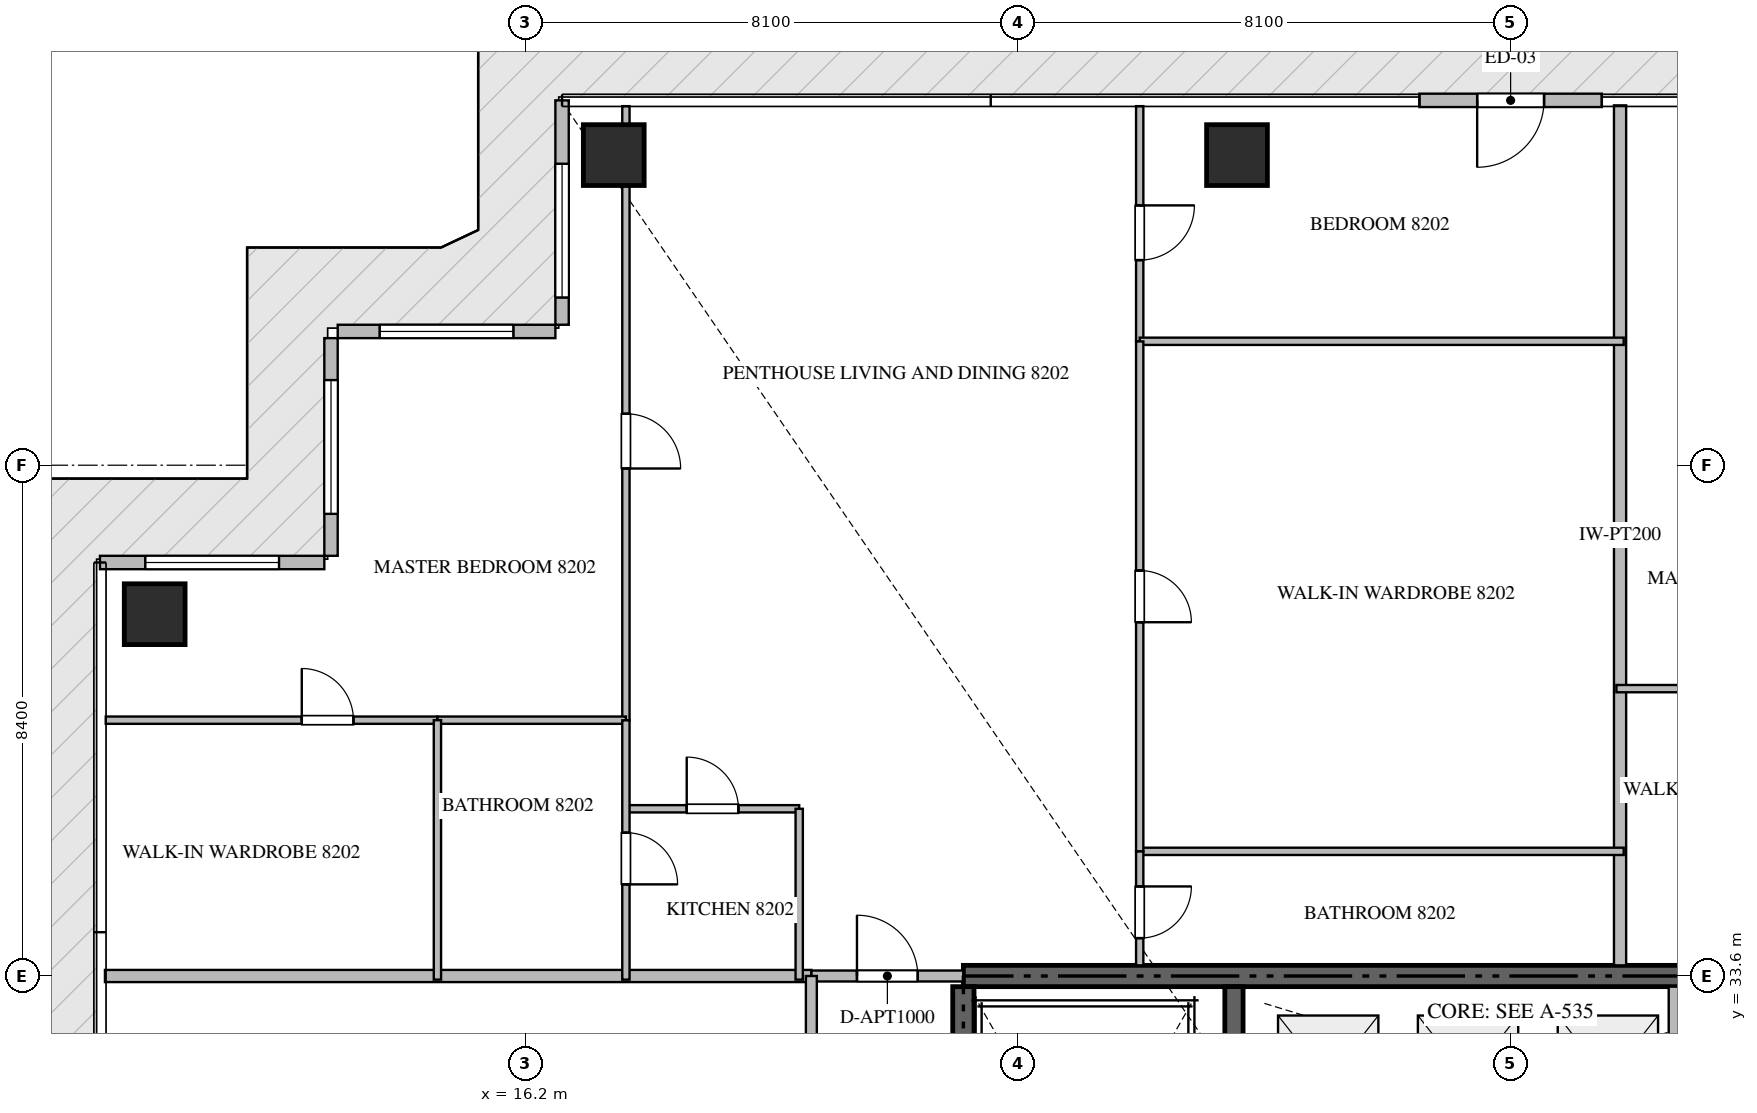
"""IFC4 building model, lengths in metres.
Left out: names, types, materials, properties, quantities, classifications, styles, units other than length and angle.
Written with IfcOpenShell. Run it as: python <this file> out.ifc"""

import sys

from ifc_helpers import new_model, si_unit, direction, frame, frame_2d, origin, origin_2d, place, context, subcontext, project, spatial, rectangle, extrude, source, transform, mapped, element, fill, save


model = new_model("IFC4")
c1 = context("Model", 3, precision=1e-05, world=origin(), true_north=direction((0.0, 1.0)))
c2 = subcontext(c1, "Body", "Model", "MODEL_VIEW")
j1 = project(units=[si_unit("LENGTHUNIT", "METRE"), si_unit("PLANEANGLEUNIT", "RADIAN")], contexts=[c1])
p1 = place(None, origin())
s1 = spatial("IfcSite", under=j1, at=p1, CompositionType="ELEMENT")
p2 = place(p1, origin())
s2 = spatial("IfcBuilding", under=s1, at=p2, CompositionType="ELEMENT")
p3 = place(p2, frame((0.0, 0.0, 329.9)))
s3 = spatial("IfcBuildingStorey", under=s2, at=p3, CompositionType="ELEMENT", Elevation=329.9)
p4 = place(p3, frame((41.4, 33.6, -0.26), z_axis=(0.0, 0.0, 1.0), x_axis=(-1.0, 0.0, 0.0)))
e1 = element("IfcWall", 1, at=p4, inside=s3, PredefinedType="SHEAR", context=c2, shape_type="SweptSolid", body=[
    extrude(rectangle(XDim=18.0, YDim=0.35, at=frame_2d((9.0, 0.0))), origin(), (0.0, 0.0, 1.0), 4.048),
])
p5 = place(p3, frame((23.4, 24.25, -0.26), z_axis=(0.0, 0.0, 1.0), x_axis=(0.0, 1.0, 0.0)))
e2 = element("IfcWall", 2, at=p5, inside=s3, PredefinedType="SHEAR", context=c2, shape_type="SweptSolid", body=[
    extrude(rectangle(XDim=9.175, YDim=0.35, at=frame_2d((4.587, 0.0))), origin(), (0.0, 0.0, 1.0), 4.048),
])
p6 = place(p3, frame((27.85, 23.55, -0.26), z_axis=(0.0, 0.0, 1.0), x_axis=(0.0, 1.0, 0.0)))
e3 = element("IfcWall", 3, at=p6, inside=s3, PredefinedType="SHEAR", context=c2, shape_type="SweptSolid", body=[
    extrude(rectangle(XDim=9.875, YDim=0.3, at=frame_2d((4.938, 0.0))), origin(), (0.0, 0.0, 1.0), 4.048),
])
m1 = source(origin(), c2, "Body", "SweptSolid", [
    extrude(rectangle(XDim=1.0, YDim=1.0, at=origin_2d()), origin(), (0.0, 0.0, 1.0), 4.05),
])
for number, where, z_axis, x_axis in (
    (4, (17.65, 47.1, -0.26), (0.0, 0.0, 1.0), (1.0, 0.0, 0.0)),
    (5, (27.9, 47.1, -0.26), (0.0, 0.0, 1.0), (1.0, 0.0, 0.0)),
    (6, (10.1, 39.55, -0.26), (0.0, 0.0, 1.0), (1.0, 0.0, 0.0)),
):
    element("IfcColumn", number, at=place(p3, frame(where, z_axis=z_axis, x_axis=x_axis)), inside=s3, PredefinedType="COLUMN", context=c2, shape_type="MappedRepresentation", body=[
        mapped(m1, transform((0.0, 0.0, 0.0), scale=1.0)),
    ])
p7 = place(p3, frame((33.9, 48.0, 0.0), z_axis=(0.0, 0.0, 1.0), x_axis=(-1.0, 0.0, 0.0)))
e7 = element("IfcWall", 7, at=p7, inside=s3, PredefinedType="ELEMENTEDWALL", context=c2, shape_type="SweptSolid", body=[
    extrude(rectangle(XDim=3.0, YDim=0.22, at=frame_2d((1.5, 0.0))), origin(), (0.0, 0.0, 1.0), 3.775),
])
p8 = place(p7, frame((0.95, 0.0, 0.0)))
e8 = element("IfcOpeningElement", 8, at=p8, cuts=e7, PredefinedType="OPENING", context=c2, shape_type="SweptSolid", body=[
    extrude(rectangle(XDim=1.1, YDim=2.2, at=frame_2d((0.55, 1.1))), frame((0.0, 0.12, 0.0), z_axis=(0.0, -1.0, 0.0), x_axis=(1.0, 0.0, 0.0)), (0.0, 0.0, 1.0), 0.24),
])
p9 = place(p3, frame((16.8, 48.0, 0.0), z_axis=(0.0, 0.0, 1.0), x_axis=(0.0, -1.0, 0.0)))
e9 = element("IfcWall", 9, at=p9, inside=s3, PredefinedType="ELEMENTEDWALL", context=c2, shape_type="SweptSolid", body=[
    extrude(rectangle(XDim=3.69, YDim=0.22, at=frame_2d((1.845, 0.0))), origin(), (0.0, 0.0, 1.0), 3.775),
])
p10 = place(p9, frame((1.043, 0.0, 0.65)))
e10 = element("IfcOpeningElement", 10, at=p10, cuts=e9, PredefinedType="OPENING", context=c2, shape_type="SweptSolid", body=[
    extrude(rectangle(XDim=2.2, YDim=2.4, at=frame_2d((1.1, 1.2))), frame((0.0, 0.12, 0.0), z_axis=(0.0, -1.0, 0.0), x_axis=(1.0, 0.0, 0.0)), (0.0, 0.0, 1.0), 0.24),
])
p11 = place(p3, frame((16.69, 44.2, 0.0), z_axis=(0.0, 0.0, 1.0), x_axis=(-1.0, 0.0, 0.0)))
e11 = element("IfcWall", 11, at=p11, inside=s3, PredefinedType="ELEMENTEDWALL", context=c2, shape_type="SweptSolid", body=[
    extrude(rectangle(XDim=3.58, YDim=0.22, at=frame_2d((1.79, 0.0))), origin(), (0.0, 0.0, 1.0), 3.775),
])
p12 = place(p11, frame((0.69, 0.0, 0.65)))
e12 = element("IfcOpeningElement", 12, at=p12, cuts=e11, PredefinedType="OPENING", context=c2, shape_type="SweptSolid", body=[
    extrude(rectangle(XDim=2.2, YDim=2.4, at=frame_2d((1.1, 1.2))), frame((0.0, 0.12, 0.0), z_axis=(0.0, -1.0, 0.0), x_axis=(1.0, 0.0, 0.0)), (0.0, 0.0, 1.0), 0.24),
])
p13 = place(p3, frame((13.0, 44.09, 0.0), z_axis=(0.0, 0.0, 1.0), x_axis=(0.0, -1.0, 0.0)))
e13 = element("IfcWall", 13, at=p13, inside=s3, PredefinedType="ELEMENTEDWALL", context=c2, shape_type="SweptSolid", body=[
    extrude(rectangle(XDim=3.58, YDim=0.22, at=frame_2d((1.79, 0.0))), origin(), (0.0, 0.0, 1.0), 3.775),
])
p14 = place(p13, frame((0.69, 0.0, 0.65)))
e14 = element("IfcOpeningElement", 14, at=p14, cuts=e13, PredefinedType="OPENING", context=c2, shape_type="SweptSolid", body=[
    extrude(rectangle(XDim=2.2, YDim=2.4, at=frame_2d((1.1, 1.2))), frame((0.0, 0.12, 0.0), z_axis=(0.0, -1.0, 0.0), x_axis=(1.0, 0.0, 0.0)), (0.0, 0.0, 1.0), 0.24),
])
p15 = place(p3, frame((12.89, 40.4, 0.0), z_axis=(0.0, 0.0, 1.0), x_axis=(-1.0, 0.0, 0.0)))
e15 = element("IfcWall", 15, at=p15, inside=s3, PredefinedType="ELEMENTEDWALL", context=c2, shape_type="SweptSolid", body=[
    extrude(rectangle(XDim=3.69, YDim=0.22, at=frame_2d((1.845, 0.0))), origin(), (0.0, 0.0, 1.0), 3.775),
])
p16 = place(p15, frame((0.745, 0.0, 0.65)))
e16 = element("IfcOpeningElement", 16, at=p16, cuts=e15, PredefinedType="OPENING", context=c2, shape_type="SweptSolid", body=[
    extrude(rectangle(XDim=2.2, YDim=2.4, at=frame_2d((1.1, 1.2))), frame((0.0, 0.12, 0.0), z_axis=(0.0, -1.0, 0.0), x_axis=(1.0, 0.0, 0.0)), (0.0, 0.0, 1.0), 0.24),
])
p17 = place(p3, frame((35.1, 30.75, 0.0), z_axis=(0.0, 0.0, 1.0), x_axis=(0.0, 1.0, 0.0)))
e17 = element("IfcWall", 17, at=p17, inside=s3, PredefinedType="STANDARD", context=c2, shape_type="SweptSolid", body=[
    extrude(rectangle(XDim=2.675, YDim=0.2, at=frame_2d((1.337, 0.0))), origin(), (0.0, 0.0, 1.0), 3.79),
])
p18 = place(p3, frame((34.2, 33.775, 0.0), z_axis=(0.0, 0.0, 1.0), x_axis=(0.0, 1.0, 0.0)))
e18 = element("IfcWall", 18, at=p18, inside=s3, PredefinedType="PARTITIONING", context=c2, shape_type="SweptSolid", body=[
    extrude(rectangle(XDim=14.143, YDim=0.2, at=frame_2d((7.072, 0.0))), origin(), (0.0, 0.0, 1.0), 3.79),
])
p19 = place(p3, frame((9.282, 33.6, 0.0), z_axis=(0.0, 0.0, 1.0), x_axis=(1.0, 0.0, 0.0)))
e19 = element("IfcWall", 19, at=p19, inside=s3, PredefinedType="PARTITIONING", context=c2, shape_type="SweptSolid", body=[
    extrude(rectangle(XDim=11.618, YDim=0.2, at=frame_2d((5.809, 0.0))), origin(), (0.0, 0.0, 1.0), 3.79),
])
p20 = place(p3, frame((20.902, 33.6, 0.0), z_axis=(0.0, 0.0, 1.0), x_axis=(1.0, 0.0, 0.0)))
e20 = element("IfcWall", 20, at=p20, inside=s3, PredefinedType="PARTITIONING", context=c2, shape_type="SweptSolid", body=[
    extrude(rectangle(XDim=2.496, YDim=0.18, at=frame_2d((1.248, 0.0))), origin(), (0.0, 0.0, 1.0), 3.79),
])
p21 = place(p20, frame((0.748, 0.0, 0.0)))
e21 = element("IfcOpeningElement", 21, at=p21, cuts=e20, PredefinedType="OPENING", context=c2, shape_type="SweptSolid", body=[
    extrude(rectangle(XDim=1.0, YDim=2.15, at=frame_2d((0.5, 1.075))), frame((0.0, 0.1, 0.0), z_axis=(0.0, -1.0, 0.0), x_axis=(1.0, 0.0, 0.0)), (0.0, 0.0, 1.0), 0.2),
])
p22 = place(p3, frame((20.9, 16.8, 0.0), z_axis=(0.0, 0.0, 1.0), x_axis=(0.0, 1.0, 0.0)))
e22 = element("IfcWall", 22, at=p22, inside=s3, PredefinedType="PARTITIONING", context=c2, shape_type="SweptSolid", body=[
    extrude(rectangle(XDim=16.8, YDim=0.18, at=frame_2d((8.4, 0.0))), origin(), (0.0, 0.0, 1.0), 3.79),
])
p23 = place(p22, frame((4.803, 0.0, 0.0)))
e23 = element("IfcOpeningElement", 23, at=p23, cuts=e22, PredefinedType="OPENING", context=c2, shape_type="SweptSolid", body=[
    extrude(rectangle(XDim=1.0, YDim=2.15, at=frame_2d((0.5, 1.075))), frame((0.0, 0.1, 0.0), z_axis=(0.0, -1.0, 0.0), x_axis=(1.0, 0.0, 0.0)), (0.0, 0.0, 1.0), 0.2),
])
p24 = place(p22, frame((13.225, 0.0, 0.0)))
e24 = element("IfcOpeningElement", 24, at=p24, cuts=e22, PredefinedType="OPENING", context=c2, shape_type="SweptSolid", body=[
    extrude(rectangle(XDim=1.0, YDim=2.15, at=frame_2d((0.5, 1.075))), frame((0.0, 0.1, 0.0), z_axis=(0.0, -1.0, 0.0), x_axis=(1.0, 0.0, 0.0)), (0.0, 0.0, 1.0), 0.2),
])
p25 = place(p3, frame((17.85, 36.35, 0.0), z_axis=(0.0, 0.0, 1.0), x_axis=(1.0, 0.0, 0.0)))
e25 = element("IfcWall", 25, at=p25, inside=s3, PredefinedType="PARTITIONING", context=c2, shape_type="SweptSolid", body=[
    extrude(rectangle(XDim=2.85, YDim=0.12, at=frame_2d((1.425, 0.0))), origin(), (0.0, 0.0, 1.0), 3.492),
])
p26 = place(p25, frame((1.0, 0.0, 0.0)))
e26 = element("IfcOpeningElement", 26, at=p26, cuts=e25, PredefinedType="OPENING", context=c2, shape_type="SweptSolid", body=[
    extrude(rectangle(XDim=0.85, YDim=2.1, at=frame_2d((0.425, 1.05))), frame((0.0, 0.07, 0.0), z_axis=(0.0, -1.0, 0.0), x_axis=(1.0, 0.0, 0.0)), (0.0, 0.0, 1.0), 0.14),
])
p27 = place(p3, frame((20.7, 36.35, 0.0), z_axis=(0.0, 0.0, 1.0), x_axis=(0.0, -1.0, 0.0)))
e27 = element("IfcWall", 27, at=p27, inside=s3, PredefinedType="PARTITIONING", context=c2, shape_type="SweptSolid", body=[
    extrude(rectangle(XDim=2.81, YDim=0.12, at=frame_2d((1.405, 0.0))), origin(), (0.0, 0.0, 1.0), 3.79),
])
p28 = place(p3, frame((17.85, 47.905, 0.0), z_axis=(0.0, 0.0, 1.0), x_axis=(0.0, -1.0, 0.0)))
e28 = element("IfcWall", 28, at=p28, inside=s3, PredefinedType="PARTITIONING", context=c2, shape_type="SweptSolid", body=[
    extrude(rectangle(XDim=10.098, YDim=0.12, at=frame_2d((5.049, 0.0))), origin(), (0.0, 0.0, 1.0), 3.292),
])
p29 = place(p28, frame((5.059, 0.0, 0.0)))
e29 = element("IfcOpeningElement", 29, at=p29, cuts=e28, PredefinedType="OPENING", context=c2, shape_type="SweptSolid", body=[
    extrude(rectangle(XDim=0.9, YDim=2.1, at=frame_2d((0.45, 1.05))), frame((0.0, 0.07, 0.0), z_axis=(0.0, -1.0, 0.0), x_axis=(1.0, 0.0, 0.0)), (0.0, 0.0, 1.0), 0.14),
])
p30 = place(p3, frame((9.295, 37.807, 0.0), z_axis=(0.0, 0.0, 1.0), x_axis=(1.0, 0.0, 0.0)))
e30 = element("IfcWall", 30, at=p30, inside=s3, PredefinedType="PARTITIONING", context=c2, shape_type="SweptSolid", body=[
    extrude(rectangle(XDim=5.455, YDim=0.12, at=frame_2d((2.728, 0.0))), origin(), (0.0, 0.0, 1.0), 3.79),
])
p31 = place(p30, frame((3.224, 0.0, 0.0)))
e31 = element("IfcOpeningElement", 31, at=p31, cuts=e30, PredefinedType="OPENING", context=c2, shape_type="SweptSolid", body=[
    extrude(rectangle(XDim=0.85, YDim=2.1, at=frame_2d((0.425, 1.05))), frame((0.0, 0.07, 0.0), z_axis=(0.0, -1.0, 0.0), x_axis=(1.0, 0.0, 0.0)), (0.0, 0.0, 1.0), 0.14),
])
p32 = place(p3, frame((14.752, 37.807, 0.0), z_axis=(0.0, 0.0, 1.0), x_axis=(1.0, 0.0, 0.0)))
e32 = element("IfcWall", 32, at=p32, inside=s3, PredefinedType="PARTITIONING", context=c2, shape_type="SweptSolid", body=[
    extrude(rectangle(XDim=3.098, YDim=0.12, at=frame_2d((1.549, 0.0))), origin(), (0.0, 0.0, 1.0), 3.79),
])
p33 = place(p3, frame((14.75, 37.807, 0.0), z_axis=(0.0, 0.0, 1.0), x_axis=(0.0, -1.0, 0.0)))
e33 = element("IfcWall", 33, at=p33, inside=s3, PredefinedType="PARTITIONING", context=c2, shape_type="SweptSolid", body=[
    extrude(rectangle(XDim=4.267, YDim=0.12, at=frame_2d((2.133, 0.0))), origin(), (0.0, 0.0, 1.0), 3.79),
])
p34 = place(p3, frame((17.85, 37.805, 0.0), z_axis=(0.0, 0.0, 1.0), x_axis=(0.0, -1.0, 0.0)))
e34 = element("IfcWall", 34, at=p34, inside=s3, PredefinedType="PARTITIONING", context=c2, shape_type="SweptSolid", body=[
    extrude(rectangle(XDim=4.265, YDim=0.12, at=frame_2d((2.132, 0.0))), origin(), (0.0, 0.0, 1.0), 3.372),
])
p35 = place(p34, frame((1.848, 0.0, 0.0)))
e35 = element("IfcOpeningElement", 35, at=p35, cuts=e34, PredefinedType="OPENING", context=c2, shape_type="SweptSolid", body=[
    extrude(rectangle(XDim=0.85, YDim=2.1, at=frame_2d((0.425, 1.05))), frame((0.0, 0.07, 0.0), z_axis=(0.0, -1.0, 0.0), x_axis=(1.0, 0.0, 0.0)), (0.0, 0.0, 1.0), 0.14),
])
p36 = place(p3, frame((26.3, 47.905, 0.0), z_axis=(0.0, 0.0, 1.0), x_axis=(0.0, -1.0, 0.0)))
e36 = element("IfcWall", 36, at=p36, inside=s3, PredefinedType="PARTITIONING", context=c2, shape_type="SweptSolid", body=[
    extrude(rectangle(XDim=3.867, YDim=0.12, at=frame_2d((1.934, 0.0))), origin(), (0.0, 0.0, 1.0), 3.79),
])
p37 = place(p36, frame((1.632, 0.0, 0.0)))
e37 = element("IfcOpeningElement", 37, at=p37, cuts=e36, PredefinedType="OPENING", context=c2, shape_type="SweptSolid", body=[
    extrude(rectangle(XDim=0.9, YDim=2.1, at=frame_2d((0.45, 1.05))), frame((0.0, 0.07, 0.0), z_axis=(0.0, -1.0, 0.0), x_axis=(1.0, 0.0, 0.0)), (0.0, 0.0, 1.0), 0.14),
])
for number, where, z_axis, x_axis in (
    (38, (26.3, 44.038, 0.0), (0.0, 0.0, 1.0), (1.0, 0.0, 0.0)),
    (39, (26.3, 35.65, 0.0), (0.0, 0.0, 1.0), (1.0, 0.0, 0.0)),
):
    element("IfcWall", number, at=place(p3, frame(where, z_axis=z_axis, x_axis=x_axis)), inside=s3, PredefinedType="PARTITIONING", context=c2, shape_type="SweptSolid", body=[
        extrude(rectangle(XDim=7.96, YDim=0.12, at=frame_2d((3.98, 0.0))), origin(), (0.0, 0.0, 1.0), 3.79),
    ])
p38 = place(p3, frame((26.3, 44.036, 0.0), z_axis=(0.0, 0.0, 1.0), x_axis=(0.0, -1.0, 0.0)))
e40 = element("IfcWall", 40, at=p38, inside=s3, PredefinedType="PARTITIONING", context=c2, shape_type="SweptSolid", body=[
    extrude(rectangle(XDim=8.386, YDim=0.12, at=frame_2d((4.193, 0.0))), origin(), (0.0, 0.0, 1.0), 3.79),
])
p39 = place(p38, frame((3.768, 0.0, 0.0)))
e41 = element("IfcOpeningElement", 41, at=p39, cuts=e40, PredefinedType="OPENING", context=c2, shape_type="SweptSolid", body=[
    extrude(rectangle(XDim=0.85, YDim=2.1, at=frame_2d((0.425, 1.05))), frame((0.0, 0.07, 0.0), z_axis=(0.0, -1.0, 0.0), x_axis=(1.0, 0.0, 0.0)), (0.0, 0.0, 1.0), 0.14),
])
p40 = place(p3, frame((26.3, 35.648, 0.0), z_axis=(0.0, 0.0, 1.0), x_axis=(0.0, -1.0, 0.0)))
e42 = element("IfcWall", 42, at=p40, inside=s3, PredefinedType="PARTITIONING", context=c2, shape_type="SweptSolid", body=[
    extrude(rectangle(XDim=1.873, YDim=0.12, at=frame_2d((0.937, 0.0))), origin(), (0.0, 0.0, 1.0), 3.79),
])
p41 = place(p40, frame((0.575, 0.0, 0.0)))
e43 = element("IfcOpeningElement", 43, at=p41, cuts=e42, PredefinedType="OPENING", context=c2, shape_type="SweptSolid", body=[
    extrude(rectangle(XDim=0.85, YDim=2.1, at=frame_2d((0.425, 1.05))), frame((0.0, 0.07, 0.0), z_axis=(0.0, -1.0, 0.0), x_axis=(1.0, 0.0, 0.0)), (0.0, 0.0, 1.0), 0.14),
])
p42 = place(p3, frame((34.14, 38.326, 0.0), z_axis=(0.0, 0.0, 1.0), x_axis=(1.0, 0.0, 0.0)))
e44 = element("IfcWall", 44, at=p42, inside=s3, PredefinedType="PARTITIONING", context=c2, shape_type="SweptSolid", body=[
    extrude(rectangle(XDim=4.47, YDim=0.12, at=frame_2d((2.235, 0.0))), origin(), (0.0, 0.0, 1.0), 3.79),
])
m2 = source(origin(), c2, "Body", "SweptSolid", [
    extrude(rectangle(XDim=1.1, YDim=2.2, at=frame_2d((0.55, 1.1))), frame((0.0, 0.025, 0.0), z_axis=(0.0, -1.0, 0.0), x_axis=(1.0, 0.0, 0.0)), (0.0, 0.0, 1.0), 0.05),
])
p43 = place(p8, origin())
e45 = element("IfcDoor", 45, at=p43, inside=s3, OperationType="SINGLE_SWING_RIGHT", PredefinedType="DOOR", context=c2, shape_type="MappedRepresentation", body=[
    mapped(m2, transform((0.0, 0.0, 0.0), scale=1.0)),
])
fill(e8, e45)
m3 = source(origin(), c2, "Body", "SweptSolid", [
    extrude(rectangle(XDim=2.2, YDim=2.4, at=frame_2d((1.1, 1.2))), frame((0.0, 0.03, 0.0), z_axis=(0.0, -1.0, 0.0), x_axis=(1.0, 0.0, 0.0)), (0.0, 0.0, 1.0), 0.06),
])
p44 = place(p10, origin())
e46 = element("IfcWindow", 46, at=p44, inside=s3, PartitioningType="SINGLE_PANEL", PredefinedType="WINDOW", context=c2, shape_type="MappedRepresentation", body=[
    mapped(m3, transform((0.0, 0.0, 0.0), scale=1.0)),
])
fill(e10, e46)
p45 = place(p12, origin())
e47 = element("IfcWindow", 47, at=p45, inside=s3, PartitioningType="SINGLE_PANEL", PredefinedType="WINDOW", context=c2, shape_type="MappedRepresentation", body=[
    mapped(m3, transform((0.0, 0.0, 0.0), scale=1.0)),
])
fill(e12, e47)
p46 = place(p14, origin())
e48 = element("IfcWindow", 48, at=p46, inside=s3, PartitioningType="SINGLE_PANEL", PredefinedType="WINDOW", context=c2, shape_type="MappedRepresentation", body=[
    mapped(m3, transform((0.0, 0.0, 0.0), scale=1.0)),
])
fill(e14, e48)
p47 = place(p16, origin())
e49 = element("IfcWindow", 49, at=p47, inside=s3, PartitioningType="SINGLE_PANEL", PredefinedType="WINDOW", context=c2, shape_type="MappedRepresentation", body=[
    mapped(m3, transform((0.0, 0.0, 0.0), scale=1.0)),
])
fill(e16, e49)
m4 = source(origin(), c2, "Body", "SweptSolid", [
    extrude(rectangle(XDim=1.0, YDim=2.15, at=frame_2d((0.5, 1.075))), frame((0.0, 0.025, 0.0), z_axis=(0.0, -1.0, 0.0), x_axis=(1.0, 0.0, 0.0)), (0.0, 0.0, 1.0), 0.05),
])
p48 = place(p21, origin())
e50 = element("IfcDoor", 50, at=p48, inside=s3, OperationType="SINGLE_SWING_LEFT", PredefinedType="DOOR", context=c2, shape_type="MappedRepresentation", body=[
    mapped(m4, transform((0.0, 0.0, 0.0), scale=1.0)),
])
fill(e21, e50)
m5 = source(origin(), c2, "Body", "SweptSolid", [
    extrude(rectangle(XDim=0.85, YDim=2.1, at=frame_2d((0.425, 1.05))), frame((0.0, 0.025, 0.0), z_axis=(0.0, -1.0, 0.0), x_axis=(1.0, 0.0, 0.0)), (0.0, 0.0, 1.0), 0.05),
])
p49 = place(p26, origin())
e51 = element("IfcDoor", 51, at=p49, inside=s3, OperationType="SINGLE_SWING_LEFT", PredefinedType="DOOR", context=c2, shape_type="MappedRepresentation", body=[
    mapped(m5, transform((0.0, 0.0, 0.0), scale=1.0)),
])
fill(e26, e51)
m6 = source(origin(), c2, "Body", "SweptSolid", [
    extrude(rectangle(XDim=0.9, YDim=2.1, at=frame_2d((0.45, 1.05))), frame((0.0, 0.025, 0.0), z_axis=(0.0, -1.0, 0.0), x_axis=(1.0, 0.0, 0.0)), (0.0, 0.0, 1.0), 0.05),
])
p50 = place(p29, origin())
e52 = element("IfcDoor", 52, at=p50, inside=s3, OperationType="SINGLE_SWING_RIGHT", PredefinedType="DOOR", context=c2, shape_type="MappedRepresentation", body=[
    mapped(m6, transform((0.0, 0.0, 0.0), scale=1.0)),
])
fill(e29, e52)
p51 = place(p31, origin())
e53 = element("IfcDoor", 53, at=p51, inside=s3, OperationType="SINGLE_SWING_LEFT", PredefinedType="DOOR", context=c2, shape_type="MappedRepresentation", body=[
    mapped(m5, transform((0.0, 0.0, 0.0), scale=1.0)),
])
fill(e31, e53)
p52 = place(p35, origin())
e54 = element("IfcDoor", 54, at=p52, inside=s3, OperationType="SINGLE_SWING_RIGHT", PredefinedType="DOOR", context=c2, shape_type="MappedRepresentation", body=[
    mapped(m5, transform((0.0, 0.0, 0.0), scale=1.0)),
])
fill(e35, e54)
p53 = place(p37, origin())
e55 = element("IfcDoor", 55, at=p53, inside=s3, OperationType="SINGLE_SWING_LEFT", PredefinedType="DOOR", context=c2, shape_type="MappedRepresentation", body=[
    mapped(m6, transform((0.0, 0.0, 0.0), scale=1.0)),
])
fill(e37, e55)
p54 = place(p39, origin())
e56 = element("IfcDoor", 56, at=p54, inside=s3, OperationType="SINGLE_SWING_RIGHT", PredefinedType="DOOR", context=c2, shape_type="MappedRepresentation", body=[
    mapped(m5, transform((0.0, 0.0, 0.0), scale=1.0)),
])
fill(e41, e56)
p55 = place(p41, origin())
e57 = element("IfcDoor", 57, at=p55, inside=s3, OperationType="SINGLE_SWING_LEFT", PredefinedType="DOOR", context=c2, shape_type="MappedRepresentation", body=[
    mapped(m5, transform((0.0, 0.0, 0.0), scale=1.0)),
])
fill(e43, e57)
save(model, sys.argv[1])
